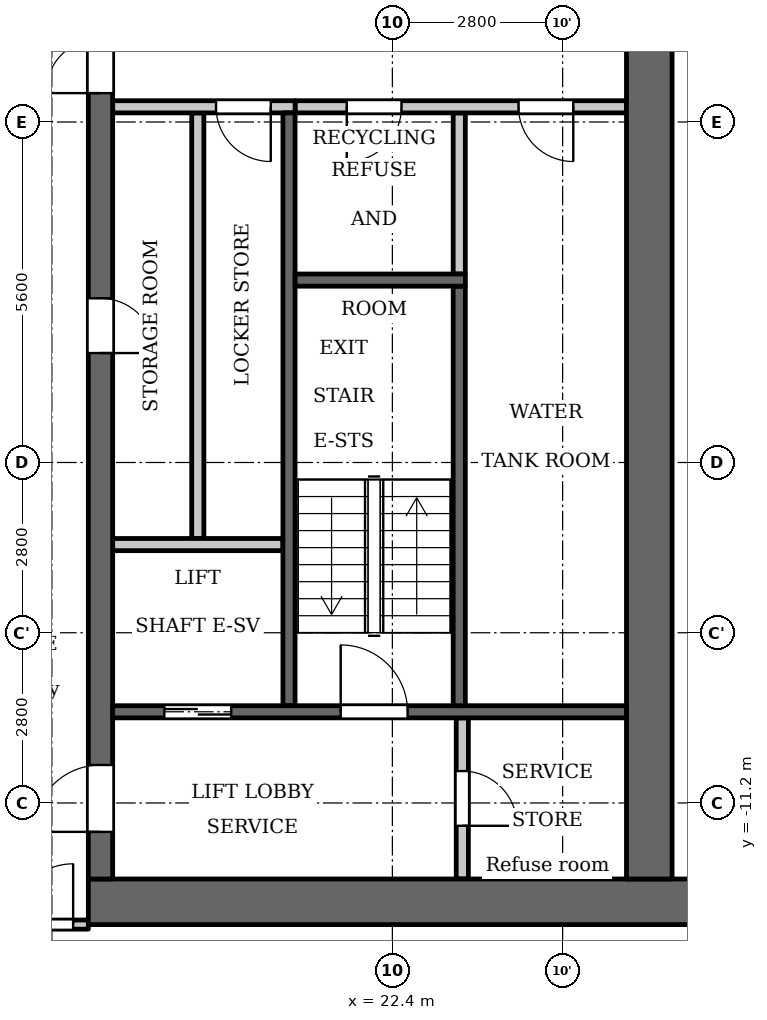
"""IFC4 building model, lengths in metres.
Left out: names, types, materials, properties, quantities, classifications, styles, units other than length and angle.
Written with IfcOpenShell. Run it as: python <this file> out.ifc"""

import sys

from ifc_helpers import new_model, si_unit, direction, frame, frame_2d, origin, place, context, subcontext, project, spatial, rectangle, extrude, element, fill, save


model = new_model("IFC4")
c1 = context("Model", 3, precision=1e-05, world=origin(), true_north=direction((0.0, 1.0)))
c2 = subcontext(c1, "Body", "Model", "MODEL_VIEW")
j1 = project(units=[si_unit("LENGTHUNIT", "METRE"), si_unit("PLANEANGLEUNIT", "RADIAN")], contexts=[c1])
p1 = place(None, origin())
s1 = spatial("IfcSite", under=j1, at=p1, CompositionType="ELEMENT")
p2 = place(p1, origin())
s2 = spatial("IfcBuilding", under=s1, at=p2, CompositionType="ELEMENT")
p3 = place(p2, frame((0.0, 0.0, 139.6)))
s3 = spatial("IfcBuildingStorey", under=s2, at=p3, CompositionType="ELEMENT", Elevation=139.6)
p4 = place(p3, frame((23.5, -2.5, 0.0), z_axis=(0.0, 0.0, 1.0), x_axis=(0.0, 1.0, 0.0)))
e1 = element("IfcWall", 1, at=p4, inside=s3, PredefinedType="PARTITIONING", context=c2, shape_type="SweptSolid", body=[
    extrude(rectangle(XDim=2.65, YDim=0.2, at=frame_2d((1.325, 0.0))), origin(), (0.0, 0.0, 1.0), 3.2),
])
p5 = place(p3, frame((20.7, -9.6, 0.0), z_axis=(0.0, 0.0, 1.0), x_axis=(0.0, 1.0, 0.0)))
e2 = element("IfcWall", 2, at=p5, inside=s3, PredefinedType="SHEAR", context=c2, shape_type="SweptSolid", body=[
    extrude(rectangle(XDim=9.75, YDim=0.2, at=frame_2d((4.875, 0.0))), origin(), (0.0, 0.0, 1.0), 3.2),
])
p6 = place(p3, frame((20.8, 0.25, 0.0), z_axis=(0.0, 0.0, 1.0), x_axis=(1.0, 0.0, 0.0)))
e3 = element("IfcWall", 3, at=p6, inside=s3, PredefinedType="PARTITIONING", context=c2, shape_type="SweptSolid", body=[
    extrude(rectangle(XDim=5.45, YDim=0.2, at=frame_2d((2.725, 0.0))), origin(), (0.0, 0.0, 1.0), 3.2),
])
p7 = place(p6, frame((0.85, 0.0, 0.0)))
e4 = element("IfcOpeningElement", 4, at=p7, cuts=e3, PredefinedType="OPENING", context=c2, shape_type="SweptSolid", body=[
    extrude(rectangle(XDim=0.9, YDim=2.1, at=frame_2d((0.45, 1.05))), frame((0.0, 0.11, 0.0), z_axis=(0.0, -1.0, 0.0), x_axis=(1.0, 0.0, 0.0)), (0.0, 0.0, 1.0), 0.22),
])
p8 = place(p6, frame((3.675, 0.0, 0.0)))
e5 = element("IfcOpeningElement", 5, at=p8, cuts=e3, PredefinedType="OPENING", context=c2, shape_type="SweptSolid", body=[
    extrude(rectangle(XDim=0.9, YDim=2.1, at=frame_2d((0.45, 1.05))), frame((0.0, 0.11, 0.0), z_axis=(0.0, -1.0, 0.0), x_axis=(1.0, 0.0, 0.0)), (0.0, 0.0, 1.0), 0.22),
])
p9 = place(p3, frame((17.4, -12.825, 0.0), z_axis=(0.0, 0.0, 1.0), x_axis=(1.0, 0.0, 0.0)))
e6 = element("IfcWall", 6, at=p9, inside=s3, PredefinedType="SHEAR", context=c2, shape_type="SweptSolid", body=[
    extrude(rectangle(XDim=10.4, YDim=0.75, at=frame_2d((5.2, 0.0))), origin(), (0.0, 0.0, 1.0), 3.2),
])
p10 = place(p3, frame((19.2, -6.85, 0.0), z_axis=(0.0, 0.0, 1.0), x_axis=(0.0, 1.0, 0.0)))
e7 = element("IfcWall", 7, at=p10, inside=s3, PredefinedType="PARTITIONING", context=c2, shape_type="SweptSolid", body=[
    extrude(rectangle(XDim=7.0, YDim=0.2, at=frame_2d((3.5, 0.0))), origin(), (0.0, 0.0, 1.0), 3.2),
])
p11 = place(p3, frame((17.6, -12.45, 0.0), z_axis=(0.0, 0.0, 1.0), x_axis=(0.0, 1.0, 0.0)))
e8 = element("IfcWall", 8, at=p11, inside=s3, PredefinedType="SHEAR", context=c2, shape_type="SweptSolid", body=[
    extrude(rectangle(XDim=24.9, YDim=0.4, at=frame_2d((12.45, 0.0))), origin(), (0.0, 0.0, 1.0), 3.2),
])
p12 = place(p11, frame((8.65, 0.0, 0.0)))
e9 = element("IfcOpeningElement", 9, at=p12, cuts=e8, PredefinedType="OPENING", context=c2, shape_type="SweptSolid", body=[
    extrude(rectangle(XDim=0.9, YDim=2.1, at=frame_2d((0.45, 1.05))), frame((0.0, 0.21, 0.0), z_axis=(0.0, -1.0, 0.0), x_axis=(1.0, 0.0, 0.0)), (0.0, 0.0, 1.0), 0.42),
])
p13 = place(p11, frame((15.6, 0.0, 0.0)))
e10 = element("IfcOpeningElement", 10, at=p13, cuts=e8, PredefinedType="OPENING", context=c2, shape_type="SweptSolid", body=[
    extrude(rectangle(XDim=1.1, YDim=2.1, at=frame_2d((0.55, 1.05))), frame((0.0, 0.21, 0.0), z_axis=(0.0, -1.0, 0.0), x_axis=(1.0, 0.0, 0.0)), (0.0, 0.0, 1.0), 0.42),
])
p14 = place(p11, frame((18.0, 0.0, 0.0)))
e11 = element("IfcOpeningElement", 11, at=p14, cuts=e8, PredefinedType="OPENING", context=c2, shape_type="SweptSolid", body=[
    extrude(rectangle(XDim=1.1, YDim=2.1, at=frame_2d((0.55, 1.05))), frame((0.0, 0.21, 0.0), z_axis=(0.0, -1.0, 0.0), x_axis=(1.0, 0.0, 0.0)), (0.0, 0.0, 1.0), 0.42),
])
p15 = place(p11, frame((23.025, 0.0, 0.0)))
e12 = element("IfcOpeningElement", 12, at=p15, cuts=e8, PredefinedType="OPENING", context=c2, shape_type="SweptSolid", body=[
    extrude(rectangle(XDim=1.1, YDim=2.1, at=frame_2d((0.55, 1.05))), frame((0.0, 0.21, 0.0), z_axis=(0.0, -1.0, 0.0), x_axis=(1.0, 0.0, 0.0)), (0.0, 0.0, 1.0), 0.42),
])
p16 = place(p11, frame((0.775, 0.0, 0.0)))
e13 = element("IfcOpeningElement", 13, at=p16, cuts=e8, PredefinedType="OPENING", context=c2, shape_type="SweptSolid", body=[
    extrude(rectangle(XDim=1.1, YDim=2.1, at=frame_2d((0.55, 1.05))), frame((0.0, 0.21, 0.0), z_axis=(0.0, -1.0, 0.0), x_axis=(1.0, 0.0, 0.0)), (0.0, 0.0, 1.0), 0.42),
])
p17 = place(p11, frame((12.925, 0.0, 0.0)))
e14 = element("IfcOpeningElement", 14, at=p17, cuts=e8, PredefinedType="OPENING", context=c2, shape_type="SweptSolid", body=[
    extrude(rectangle(XDim=1.8, YDim=2.1, at=frame_2d((0.9, 1.05))), frame((0.0, 0.21, 0.0), z_axis=(0.0, -1.0, 0.0), x_axis=(1.0, 0.0, 0.0)), (0.0, 0.0, 1.0), 0.42),
])
p18 = place(p3, frame((26.625, -12.45, 0.0), z_axis=(0.0, 0.0, 1.0), x_axis=(0.0, 1.0, 0.0)))
e15 = element("IfcWall", 15, at=p18, inside=s3, PredefinedType="SHEAR", context=c2, shape_type="SweptSolid", body=[
    extrude(rectangle(XDim=24.9, YDim=0.75, at=frame_2d((12.45, 0.0))), origin(), (0.0, 0.0, 1.0), 3.2),
])
p19 = place(p3, frame((23.55, -12.45, 0.0), z_axis=(0.0, 0.0, 1.0), x_axis=(0.0, 1.0, 0.0)))
e16 = element("IfcWall", 16, at=p19, inside=s3, PredefinedType="PARTITIONING", context=c2, shape_type="SweptSolid", body=[
    extrude(rectangle(XDim=2.65, YDim=0.2, at=frame_2d((1.325, 0.0))), origin(), (0.0, 0.0, 1.0), 3.2),
])
p20 = place(p19, frame((0.875, 0.0, 0.0)))
e17 = element("IfcOpeningElement", 17, at=p20, cuts=e16, PredefinedType="OPENING", context=c2, shape_type="SweptSolid", body=[
    extrude(rectangle(XDim=0.9, YDim=2.1, at=frame_2d((0.45, 1.05))), frame((0.0, 0.11, 0.0), z_axis=(0.0, -1.0, 0.0), x_axis=(1.0, 0.0, 0.0)), (0.0, 0.0, 1.0), 0.22),
])
p21 = place(p3, frame((17.8, -9.7, 0.0), z_axis=(0.0, 0.0, 1.0), x_axis=(1.0, 0.0, 0.0)))
e18 = element("IfcWall", 18, at=p21, inside=s3, PredefinedType="SHEAR", context=c2, shape_type="SweptSolid", body=[
    extrude(rectangle(XDim=8.45, YDim=0.2, at=frame_2d((4.225, 0.0))), origin(), (0.0, 0.0, 1.0), 3.2),
])
p22 = place(p21, frame((0.85, 0.0, 0.0)))
e19 = element("IfcOpeningElement", 19, at=p22, cuts=e18, PredefinedType="OPENING", context=c2, shape_type="SweptSolid", body=[
    extrude(rectangle(XDim=1.1, YDim=2.1, at=frame_2d((0.55, 1.05))), frame((0.0, 0.11, 0.0), z_axis=(0.0, -1.0, 0.0), x_axis=(1.0, 0.0, 0.0)), (0.0, 0.0, 1.0), 0.22),
])
p23 = place(p21, frame((3.75, 0.0, 0.0)))
e20 = element("IfcOpeningElement", 20, at=p23, cuts=e18, PredefinedType="OPENING", context=c2, shape_type="SweptSolid", body=[
    extrude(rectangle(XDim=1.1, YDim=2.1, at=frame_2d((0.55, 1.05))), frame((0.0, 0.11, 0.0), z_axis=(0.0, -1.0, 0.0), x_axis=(1.0, 0.0, 0.0)), (0.0, 0.0, 1.0), 0.22),
])
p24 = place(p3, frame((17.8, -6.95, 0.0), z_axis=(0.0, 0.0, 1.0), x_axis=(1.0, 0.0, 0.0)))
e21 = element("IfcWall", 21, at=p24, inside=s3, PredefinedType="PARTITIONING", context=c2, shape_type="SweptSolid", body=[
    extrude(rectangle(XDim=2.8, YDim=0.2, at=frame_2d((1.4, 0.0))), origin(), (0.0, 0.0, 1.0), 3.2),
])
p25 = place(p3, frame((17.8, 0.25, 0.0), z_axis=(0.0, 0.0, 1.0), x_axis=(1.0, 0.0, 0.0)))
e22 = element("IfcWall", 22, at=p25, inside=s3, PredefinedType="PARTITIONING", context=c2, shape_type="SweptSolid", body=[
    extrude(rectangle(XDim=3.0, YDim=0.2, at=frame_2d((1.5, 0.0))), origin(), (0.0, 0.0, 1.0), 3.2),
])
p26 = place(p25, frame((1.7, 0.0, 0.0)))
e23 = element("IfcOpeningElement", 23, at=p26, cuts=e22, PredefinedType="OPENING", context=c2, shape_type="SweptSolid", body=[
    extrude(rectangle(XDim=0.9, YDim=2.1, at=frame_2d((0.45, 1.05))), frame((0.0, 0.11, 0.0), z_axis=(0.0, -1.0, 0.0), x_axis=(1.0, 0.0, 0.0)), (0.0, 0.0, 1.0), 0.22),
])
p27 = place(p3, frame((23.5, -9.6, 0.0), z_axis=(0.0, 0.0, 1.0), x_axis=(0.0, 1.0, 0.0)))
e24 = element("IfcWall", 24, at=p27, inside=s3, PredefinedType="SHEAR", context=c2, shape_type="SweptSolid", body=[
    extrude(rectangle(XDim=6.9, YDim=0.2, at=frame_2d((3.45, 0.0))), origin(), (0.0, 0.0, 1.0), 3.2),
])
p28 = place(p3, frame((20.8, -2.6, 0.0), z_axis=(0.0, 0.0, 1.0), x_axis=(1.0, 0.0, 0.0)))
e25 = element("IfcWall", 25, at=p28, inside=s3, PredefinedType="SHEAR", context=c2, shape_type="SweptSolid", body=[
    extrude(rectangle(XDim=2.8, YDim=0.2, at=frame_2d((1.4, 0.0))), origin(), (0.0, 0.0, 1.0), 3.2),
])
p29 = place(p3, frame((-17.4, -13.2, 0.0), z_axis=(0.0, 0.0, 1.0), x_axis=(1.0, 0.0, 0.0)))
e26 = element("IfcWall", 26, at=p29, inside=s3, PredefinedType="PARTITIONING", context=c2, shape_type="SweptSolid", body=[
    extrude(rectangle(XDim=34.8, YDim=0.15, at=frame_2d((17.4, 0.0))), origin(), (0.0, 0.0, 1.0), 3.2),
])
p30 = place(p29, frame((0.15, 0.0, 0.0)))
e27 = element("IfcOpeningElement", 27, at=p30, cuts=e26, PredefinedType="OPENING", context=c2, shape_type="SweptSolid", body=[
    extrude(rectangle(XDim=1.0, YDim=2.1, at=frame_2d((0.5, 1.05))), frame((0.0, 0.085, 0.0), z_axis=(0.0, -1.0, 0.0), x_axis=(1.0, 0.0, 0.0)), (0.0, 0.0, 1.0), 0.17),
])
p31 = place(p29, frame((33.55, 0.0, 0.0)))
e28 = element("IfcOpeningElement", 28, at=p31, cuts=e26, PredefinedType="OPENING", context=c2, shape_type="SweptSolid", body=[
    extrude(rectangle(XDim=1.0, YDim=2.1, at=frame_2d((0.5, 1.05))), frame((0.0, 0.085, 0.0), z_axis=(0.0, -1.0, 0.0), x_axis=(1.0, 0.0, 0.0)), (0.0, 0.0, 1.0), 0.17),
])
p32 = place(p29, frame((6.85, 0.0, 0.0)))
e29 = element("IfcOpeningElement", 29, at=p32, cuts=e26, PredefinedType="OPENING", context=c2, shape_type="SweptSolid", body=[
    extrude(rectangle(XDim=1.0, YDim=2.1, at=frame_2d((0.5, 1.05))), frame((0.0, 0.085, 0.0), z_axis=(0.0, -1.0, 0.0), x_axis=(1.0, 0.0, 0.0)), (0.0, 0.0, 1.0), 0.17),
])
p33 = place(p29, frame((12.45, 0.0, 0.0)))
e30 = element("IfcOpeningElement", 30, at=p33, cuts=e26, PredefinedType="OPENING", context=c2, shape_type="SweptSolid", body=[
    extrude(rectangle(XDim=1.0, YDim=2.1, at=frame_2d((0.5, 1.05))), frame((0.0, 0.085, 0.0), z_axis=(0.0, -1.0, 0.0), x_axis=(1.0, 0.0, 0.0)), (0.0, 0.0, 1.0), 0.17),
])
p34 = place(p29, frame((21.3, 0.0, 0.0)))
e31 = element("IfcOpeningElement", 31, at=p34, cuts=e26, PredefinedType="OPENING", context=c2, shape_type="SweptSolid", body=[
    extrude(rectangle(XDim=1.0, YDim=2.1, at=frame_2d((0.5, 1.05))), frame((0.0, 0.085, 0.0), z_axis=(0.0, -1.0, 0.0), x_axis=(1.0, 0.0, 0.0)), (0.0, 0.0, 1.0), 0.17),
])
p35 = place(p29, frame((26.9, 0.0, 0.0)))
e32 = element("IfcOpeningElement", 32, at=p35, cuts=e26, PredefinedType="OPENING", context=c2, shape_type="SweptSolid", body=[
    extrude(rectangle(XDim=1.0, YDim=2.1, at=frame_2d((0.5, 1.05))), frame((0.0, 0.085, 0.0), z_axis=(0.0, -1.0, 0.0), x_axis=(1.0, 0.0, 0.0)), (0.0, 0.0, 1.0), 0.17),
])
p36 = place(p22, origin())
e33 = element("IfcDoor", 33, at=p36, inside=s3, OperationType="DOUBLE_DOOR_SLIDING", PredefinedType="DOOR", context=c2, shape_type="SweptSolid", body=[
    extrude(rectangle(XDim=1.1, YDim=2.1, at=frame_2d((0.55, 1.05))), frame((0.0, 0.025, 0.0), z_axis=(0.0, -1.0, 0.0), x_axis=(1.0, 0.0, 0.0)), (0.0, 0.0, 1.0), 0.05),
])
fill(e19, e33)
p37 = place(p12, origin())
e34 = element("IfcDoor", 34, at=p37, inside=s3, OperationType="SINGLE_SWING_LEFT", PredefinedType="DOOR", context=c2, shape_type="SweptSolid", body=[
    extrude(rectangle(XDim=0.9, YDim=2.1, at=frame_2d((0.45, 1.05))), frame((0.0, 0.025, 0.0), z_axis=(0.0, -1.0, 0.0), x_axis=(1.0, 0.0, 0.0)), (0.0, 0.0, 1.0), 0.05),
])
fill(e9, e34)
p38 = place(p26, origin())
e35 = element("IfcDoor", 35, at=p38, inside=s3, OperationType="SINGLE_SWING_RIGHT", PredefinedType="DOOR", context=c2, shape_type="SweptSolid", body=[
    extrude(rectangle(XDim=0.9, YDim=2.1, at=frame_2d((0.45, 1.05))), frame((0.0, 0.025, 0.0), z_axis=(0.0, -1.0, 0.0), x_axis=(1.0, 0.0, 0.0)), (0.0, 0.0, 1.0), 0.05),
])
fill(e23, e35)
p39 = place(p16, origin())
e36 = element("IfcDoor", 36, at=p39, inside=s3, OperationType="SINGLE_SWING_RIGHT", PredefinedType="DOOR", context=c2, shape_type="SweptSolid", body=[
    extrude(rectangle(XDim=1.1, YDim=2.1, at=frame_2d((0.55, 1.05))), frame((0.0, 0.025, 0.0), z_axis=(0.0, -1.0, 0.0), x_axis=(1.0, 0.0, 0.0)), (0.0, 0.0, 1.0), 0.05),
])
fill(e13, e36)
p40 = place(p20, origin())
e37 = element("IfcDoor", 37, at=p40, inside=s3, OperationType="SINGLE_SWING_LEFT", PredefinedType="DOOR", context=c2, shape_type="SweptSolid", body=[
    extrude(rectangle(XDim=0.9, YDim=2.1, at=frame_2d((0.45, 1.05))), frame((0.0, 0.025, 0.0), z_axis=(0.0, -1.0, 0.0), x_axis=(1.0, 0.0, 0.0)), (0.0, 0.0, 1.0), 0.05),
])
fill(e17, e37)
p41 = place(p23, origin())
e38 = element("IfcDoor", 38, at=p41, inside=s3, OperationType="SINGLE_SWING_RIGHT", PredefinedType="DOOR", context=c2, shape_type="SweptSolid", body=[
    extrude(rectangle(XDim=1.1, YDim=2.1, at=frame_2d((0.55, 1.05))), frame((0.0, 0.025, 0.0), z_axis=(0.0, -1.0, 0.0), x_axis=(1.0, 0.0, 0.0)), (0.0, 0.0, 1.0), 0.05),
])
fill(e20, e38)
p42 = place(p17, origin())
e39 = element("IfcDoor", 39, at=p42, inside=s3, OperationType="DOUBLE_DOOR_SINGLE_SWING", PredefinedType="DOOR", context=c2, shape_type="SweptSolid", body=[
    extrude(rectangle(XDim=1.8, YDim=2.1, at=frame_2d((0.9, 1.05))), frame((0.0, 0.025, 0.0), z_axis=(0.0, -1.0, 0.0), x_axis=(1.0, 0.0, 0.0)), (0.0, 0.0, 1.0), 0.05),
])
fill(e14, e39)
p43 = place(p7, origin())
e40 = element("IfcDoor", 40, at=p43, inside=s3, OperationType="SINGLE_SWING_LEFT", PredefinedType="DOOR", context=c2, shape_type="SweptSolid", body=[
    extrude(rectangle(XDim=0.9, YDim=2.1, at=frame_2d((0.45, 1.05))), frame((0.0, 0.025, 0.0), z_axis=(0.0, -1.0, 0.0), x_axis=(1.0, 0.0, 0.0)), (0.0, 0.0, 1.0), 0.05),
])
fill(e4, e40)
p44 = place(p8, origin())
e41 = element("IfcDoor", 41, at=p44, inside=s3, OperationType="SINGLE_SWING_RIGHT", PredefinedType="DOOR", context=c2, shape_type="SweptSolid", body=[
    extrude(rectangle(XDim=0.9, YDim=2.1, at=frame_2d((0.45, 1.05))), frame((0.0, 0.025, 0.0), z_axis=(0.0, -1.0, 0.0), x_axis=(1.0, 0.0, 0.0)), (0.0, 0.0, 1.0), 0.05),
])
fill(e5, e41)
p45 = place(p31, origin())
e42 = element("IfcDoor", 42, at=p45, inside=s3, OperationType="SINGLE_SWING_LEFT", PredefinedType="DOOR", context=c2, shape_type="SweptSolid", body=[
    extrude(rectangle(XDim=1.0, YDim=2.1, at=frame_2d((0.5, 1.05))), frame((0.0, 0.025, 0.0), z_axis=(0.0, -1.0, 0.0), x_axis=(1.0, 0.0, 0.0)), (0.0, 0.0, 1.0), 0.05),
])
fill(e28, e42)
save(model, sys.argv[1])
